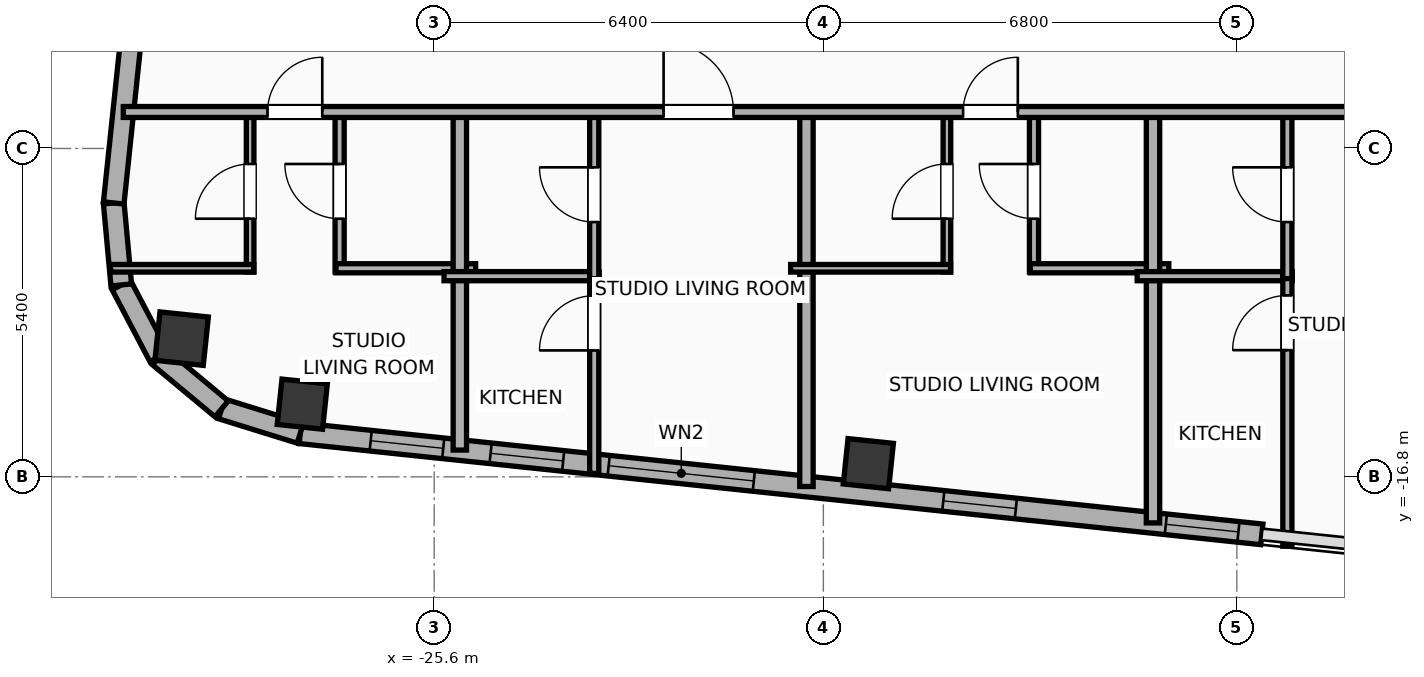
"""IFC4 building model, lengths in metres.
Left out: names, types, materials, properties, quantities, classifications, styles, units other than length and angle.
Written with IfcOpenShell. Run it as: python <this file> out.ifc"""

import sys

from ifc_helpers import new_model, si_unit, direction, frame, frame_2d, origin, origin_2d, place, context, subcontext, project, spatial, rectangle, hollow_rectangle, hollow_circle, extrude, element, fill, save


model = new_model("IFC4")
c1 = context("Model", 3, precision=1e-05, world=origin(), true_north=direction((0.0, 1.0)))
c2 = subcontext(c1, "Body", "Model", "MODEL_VIEW")
j1 = project(units=[si_unit("LENGTHUNIT", "METRE"), si_unit("PLANEANGLEUNIT", "RADIAN")], contexts=[c1])
p1 = place(None, origin())
s1 = spatial("IfcSite", under=j1, at=p1, CompositionType="ELEMENT")
p2 = place(p1, origin())
s2 = spatial("IfcBuilding", under=s1, at=p2, CompositionType="ELEMENT")
p3 = place(p2, frame((0.0, 0.0, 275.6)))
s3 = spatial("IfcBuildingStorey", under=s2, at=p3, CompositionType="ELEMENT", Elevation=275.6)
for number, where, z_axis, x_axis in (
    (1, (-27.769, -15.604, 0.0), (0.0, 0.0, 1.0), (0.995, -0.105, 0.0)),
    (2, (-18.46, -16.583, 0.0), (0.0, 0.0, 1.0), (0.995, -0.105, 0.0)),
):
    element("IfcColumn", number, at=place(p3, frame(where, z_axis=z_axis, x_axis=x_axis)), inside=s3, PredefinedType="COLUMN", context=c2, shape_type="SweptSolid", body=[
        extrude(hollow_rectangle(XDim=0.75, YDim=0.75, WallThickness=0.025, at=origin_2d()), origin(), (0.0, 0.0, 1.0), 3.9),
    ])
p4 = place(p3, frame((-29.753, -14.527, 0.0), z_axis=(0.0, 0.0, 1.0), x_axis=(0.994521895368, -0.104528463268, 0.0)))
e3 = element("IfcColumn", 3, at=p4, inside=s3, PredefinedType="COLUMN", context=c2, shape_type="SweptSolid", body=[
    extrude(hollow_circle(Radius=0.4, WallThickness=0.028, at=origin_2d()), origin(), (0.0, 0.0, 1.0), 3.9),
])
p5 = place(p3, frame((-11.989, -17.746, 0.0), z_axis=(0.0, 0.0, 1.0), x_axis=(-0.994521594531, 0.104531325504, 0.0)))
e4 = element("IfcWall", 4, at=p5, inside=s3, PredefinedType="ELEMENTEDWALL", context=c2, shape_type="SweptSolid", body=[
    extrude(rectangle(XDim=15.901, YDim=0.34, at=frame_2d((7.95, 0.0))), origin(), (0.0, 0.0, 1.0), 3.65),
])
p6 = place(p5, frame((8.4, 0.0, 0.75)))
e5 = element("IfcOpeningElement", 5, at=p6, cuts=e4, PredefinedType="OPENING", context=c2, shape_type="SweptSolid", body=[
    extrude(rectangle(XDim=2.4, YDim=2.1, at=frame_2d((1.2, 1.05))), frame((0.0, 0.18, 0.0), z_axis=(0.0, -1.0, 0.0), x_axis=(1.0, 0.0, 0.0)), (0.0, 0.0, 1.0), 0.36),
])
p7 = place(p5, frame((13.536, 0.0, 0.75)))
e6 = element("IfcOpeningElement", 6, at=p7, cuts=e4, PredefinedType="OPENING", context=c2, shape_type="SweptSolid", body=[
    extrude(rectangle(XDim=1.2, YDim=2.05, at=frame_2d((0.6, 1.025))), frame((0.0, 0.18, 0.0), z_axis=(0.0, -1.0, 0.0), x_axis=(1.0, 0.0, 0.0)), (0.0, 0.0, 1.0), 0.36),
])
p8 = place(p5, frame((11.553, 0.0, 0.75)))
e7 = element("IfcOpeningElement", 7, at=p8, cuts=e4, PredefinedType="OPENING", context=c2, shape_type="SweptSolid", body=[
    extrude(rectangle(XDim=1.2, YDim=2.05, at=frame_2d((0.6, 1.025))), frame((0.0, 0.18, 0.0), z_axis=(0.0, -1.0, 0.0), x_axis=(1.0, 0.0, 0.0)), (0.0, 0.0, 1.0), 0.36),
])
p9 = place(p5, frame((4.067, 0.0, 0.75)))
e8 = element("IfcOpeningElement", 8, at=p9, cuts=e4, PredefinedType="OPENING", context=c2, shape_type="SweptSolid", body=[
    extrude(rectangle(XDim=1.2, YDim=2.05, at=frame_2d((0.6, 1.025))), frame((0.0, 0.18, 0.0), z_axis=(0.0, -1.0, 0.0), x_axis=(1.0, 0.0, 0.0)), (0.0, 0.0, 1.0), 0.36),
])
p10 = place(p5, frame((0.387, 0.0, 0.75)))
e9 = element("IfcOpeningElement", 9, at=p10, cuts=e4, PredefinedType="OPENING", context=c2, shape_type="SweptSolid", body=[
    extrude(rectangle(XDim=1.2, YDim=2.05, at=frame_2d((0.6, 1.025))), frame((0.0, 0.18, 0.0), z_axis=(0.0, -1.0, 0.0), x_axis=(1.0, 0.0, 0.0)), (0.0, 0.0, 1.0), 0.36),
])
p11 = place(p3, frame((-27.802, -16.084, 0.0), z_axis=(0.0, 0.0, 1.0), x_axis=(-0.955007802701, 0.296580674994, 0.0)))
e10 = element("IfcWall", 10, at=p11, inside=s3, PredefinedType="ELEMENTEDWALL", context=c2, shape_type="SweptSolid", body=[
    extrude(rectangle(XDim=1.354, YDim=0.34, at=frame_2d((0.677, 0.0))), origin(), (0.0, 0.0, 1.0), 3.65),
])
p12 = place(p3, frame((-29.096, -15.682, 0.0), z_axis=(0.0, 0.0, 1.0), x_axis=(-0.768864427906, 0.639411832469, 0.0)))
e11 = element("IfcWall", 11, at=p12, inside=s3, PredefinedType="ELEMENTEDWALL", context=c2, shape_type="SweptSolid", body=[
    extrude(rectangle(XDim=1.337, YDim=0.34, at=frame_2d((0.668, 0.0))), origin(), (0.0, 0.0, 1.0), 3.65),
])
p13 = place(p3, frame((-30.124, -14.827, 0.0), z_axis=(0.0, 0.0, 1.0), x_axis=(-0.465528132217, 0.885033083062, 0.0)))
e12 = element("IfcWall", 12, at=p13, inside=s3, PredefinedType="ELEMENTEDWALL", context=c2, shape_type="SweptSolid", body=[
    extrude(rectangle(XDim=1.337, YDim=0.34, at=frame_2d((0.668, 0.0))), origin(), (0.0, 0.0, 1.0), 3.65),
])
p14 = place(p3, frame((-30.746, -13.644, 0.0), z_axis=(0.0, 0.0, 1.0), x_axis=(-0.091592370975, 0.995796584438, 0.0)))
e13 = element("IfcWall", 13, at=p14, inside=s3, PredefinedType="ELEMENTEDWALL", context=c2, shape_type="SweptSolid", body=[
    extrude(rectangle(XDim=1.354, YDim=0.34, at=frame_2d((0.677, 0.0))), origin(), (0.0, 0.0, 1.0), 3.65),
])
p15 = place(p3, frame((-30.87, -12.296, 0.0), z_axis=(0.0, 0.0, 1.0), x_axis=(0.104517379014, 0.994523060308, 0.0)))
e14 = element("IfcWall", 14, at=p15, inside=s3, PredefinedType="ELEMENTEDWALL", context=c2, shape_type="SweptSolid", body=[
    extrude(rectangle(XDim=10.325, YDim=0.34, at=frame_2d((5.162, 0.0))), origin(), (0.0, 0.0, 1.0), 3.65),
])
p16 = place(p15, frame((4.262, 0.0, 0.75)))
e15 = element("IfcOpeningElement", 15, at=p16, cuts=e14, PredefinedType="OPENING", context=c2, shape_type="SweptSolid", body=[
    extrude(rectangle(XDim=1.8, YDim=2.1, at=frame_2d((0.9, 1.05))), frame((0.0, 0.18, 0.0), z_axis=(0.0, -1.0, 0.0), x_axis=(1.0, 0.0, 0.0)), (0.0, 0.0, 1.0), 0.36),
])
p17 = place(p3, frame((-28.627, -13.43, 0.0), z_axis=(0.0, 0.0, 1.0), x_axis=(0.0, 1.0, 0.0)))
e16 = element("IfcWall", 16, at=p17, inside=s3, PredefinedType="PARTITIONING", context=c2, shape_type="SweptSolid", body=[
    extrude(rectangle(XDim=2.65, YDim=0.125, at=frame_2d((1.325, 0.0))), origin(), (0.0, 0.0, 1.0), 3.65),
])
p18 = place(p17, frame((0.875, 0.0, 0.0)))
e17 = element("IfcOpeningElement", 17, at=p18, cuts=e16, PredefinedType="OPENING", context=c2, shape_type="SweptSolid", body=[
    extrude(rectangle(XDim=0.9, YDim=2.05, at=frame_2d((0.45, 1.025))), frame((0.0, 0.073, 0.0), z_axis=(0.0, -1.0, 0.0), x_axis=(1.0, 0.0, 0.0)), (0.0, 0.0, 1.0), 0.145),
])
p19 = place(p3, frame((-27.155, -13.43, 0.0), z_axis=(0.0, 0.0, 1.0), x_axis=(0.0, 1.0, 0.0)))
e18 = element("IfcWall", 18, at=p19, inside=s3, PredefinedType="PLUMBINGWALL", context=c2, shape_type="SweptSolid", body=[
    extrude(rectangle(XDim=2.65, YDim=0.15, at=frame_2d((1.325, 0.0))), origin(), (0.0, 0.0, 1.0), 3.65),
])
p20 = place(p19, frame((0.875, 0.0, 0.0)))
e19 = element("IfcOpeningElement", 19, at=p20, cuts=e18, PredefinedType="OPENING", context=c2, shape_type="SweptSolid", body=[
    extrude(rectangle(XDim=0.9, YDim=2.05, at=frame_2d((0.45, 1.025))), frame((0.0, 0.085, 0.0), z_axis=(0.0, -1.0, 0.0), x_axis=(1.0, 0.0, 0.0)), (0.0, 0.0, 1.0), 0.17),
])
p21 = place(p3, frame((-30.922, -13.37, 0.0), z_axis=(0.0, 0.0, 1.0), x_axis=(1.0, 0.0, 0.0)))
e20 = element("IfcWall", 20, at=p21, inside=s3, PredefinedType="PARTITIONING", context=c2, shape_type="SweptSolid", body=[
    extrude(rectangle(XDim=2.355, YDim=0.125, at=frame_2d((1.178, 0.0))), origin(), (0.0, 0.0, 1.0), 3.65),
])
p22 = place(p3, frame((-27.215, -13.37, 0.0), z_axis=(0.0, 0.0, 1.0), x_axis=(1.0, 0.0, 0.0)))
e21 = element("IfcWall", 21, at=p22, inside=s3, PredefinedType="PLUMBINGWALL", context=c2, shape_type="SweptSolid", body=[
    extrude(rectangle(XDim=2.297, YDim=0.15, at=frame_2d((1.148, 0.0))), origin(), (0.0, 0.0, 1.0), 3.65),
])
p23 = place(p3, frame((-25.178, -16.36, 0.0), z_axis=(0.0, 0.0, 1.0), x_axis=(0.0, 1.0, 0.0)))
e22 = element("IfcWall", 22, at=p23, inside=s3, PredefinedType="PARTITIONING", context=c2, shape_type="SweptSolid", body=[
    extrude(rectangle(XDim=5.64, YDim=0.22, at=frame_2d((2.82, 0.0))), origin(), (0.0, 0.0, 1.0), 3.65),
])
p24 = place(p3, frame((-25.438, -13.5, 0.0), z_axis=(0.0, 0.0, 1.0), x_axis=(1.0, 0.0, 0.0)))
e23 = element("IfcWall", 23, at=p24, inside=s3, PredefinedType="PLUMBINGWALL", context=c2, shape_type="SweptSolid", body=[
    extrude(rectangle(XDim=2.55, YDim=0.15, at=frame_2d((1.275, 0.0))), origin(), (0.0, 0.0, 1.0), 3.65),
])
p25 = place(p3, frame((-22.968, -16.743, 0.0), z_axis=(0.0, 0.0, 1.0), x_axis=(0.0, 1.0, 0.0)))
e24 = element("IfcWall", 24, at=p25, inside=s3, PredefinedType="PLUMBINGWALL", context=c2, shape_type="SweptSolid", body=[
    extrude(rectangle(XDim=3.283, YDim=0.15, at=frame_2d((1.641, 0.0))), origin(), (0.0, 0.0, 1.0), 3.65),
])
p26 = place(p25, frame((2.022, 0.0, 0.0)))
e25 = element("IfcOpeningElement", 25, at=p26, cuts=e24, PredefinedType="OPENING", context=c2, shape_type="SweptSolid", body=[
    extrude(rectangle(XDim=0.9, YDim=2.05, at=frame_2d((0.45, 1.025))), frame((0.0, 0.085, 0.0), z_axis=(0.0, -1.0, 0.0), x_axis=(1.0, 0.0, 0.0)), (0.0, 0.0, 1.0), 0.17),
])
p27 = place(p3, frame((-22.968, -13.54, 0.0), z_axis=(0.0, 0.0, 1.0), x_axis=(0.0, 1.0, 0.0)))
e26 = element("IfcWall", 26, at=p27, inside=s3, PredefinedType="PLUMBINGWALL", context=c2, shape_type="SweptSolid", body=[
    extrude(rectangle(XDim=2.76, YDim=0.15, at=frame_2d((1.38, 0.0))), origin(), (0.0, 0.0, 1.0), 3.65),
])
p28 = place(p27, frame((0.93, 0.0, 0.0)))
e27 = element("IfcOpeningElement", 27, at=p28, cuts=e26, PredefinedType="OPENING", context=c2, shape_type="SweptSolid", body=[
    extrude(rectangle(XDim=0.9, YDim=2.05, at=frame_2d((0.45, 1.025))), frame((0.0, 0.085, 0.0), z_axis=(0.0, -1.0, 0.0), x_axis=(1.0, 0.0, 0.0)), (0.0, 0.0, 1.0), 0.17),
])
p29 = place(p3, frame((-19.478, -16.959, 0.0), z_axis=(0.0, 0.0, 1.0), x_axis=(0.0, 1.0, 0.0)))
e28 = element("IfcWall", 28, at=p29, inside=s3, PredefinedType="PARTITIONING", context=c2, shape_type="SweptSolid", body=[
    extrude(rectangle(XDim=6.239, YDim=0.22, at=frame_2d((3.119, 0.0))), origin(), (0.0, 0.0, 1.0), 3.65),
])
p30 = place(p3, frame((-17.168, -13.43, 0.0), z_axis=(0.0, 0.0, 1.0), x_axis=(0.0, 1.0, 0.0)))
e29 = element("IfcWall", 29, at=p30, inside=s3, PredefinedType="PARTITIONING", context=c2, shape_type="SweptSolid", body=[
    extrude(rectangle(XDim=2.65, YDim=0.125, at=frame_2d((1.325, 0.0))), origin(), (0.0, 0.0, 1.0), 3.65),
])
p31 = place(p30, frame((0.875, 0.0, 0.0)))
e30 = element("IfcOpeningElement", 30, at=p31, cuts=e29, PredefinedType="OPENING", context=c2, shape_type="SweptSolid", body=[
    extrude(rectangle(XDim=0.9, YDim=2.05, at=frame_2d((0.45, 1.025))), frame((0.0, 0.073, 0.0), z_axis=(0.0, -1.0, 0.0), x_axis=(1.0, 0.0, 0.0)), (0.0, 0.0, 1.0), 0.145),
])
p32 = place(p3, frame((-15.736, -13.43, 0.0), z_axis=(0.0, 0.0, 1.0), x_axis=(0.0, 1.0, 0.0)))
e31 = element("IfcWall", 31, at=p32, inside=s3, PredefinedType="PLUMBINGWALL", context=c2, shape_type="SweptSolid", body=[
    extrude(rectangle(XDim=2.65, YDim=0.15, at=frame_2d((1.325, 0.0))), origin(), (0.0, 0.0, 1.0), 3.65),
])
p33 = place(p32, frame((0.875, 0.0, 0.0)))
e32 = element("IfcOpeningElement", 32, at=p33, cuts=e31, PredefinedType="OPENING", context=c2, shape_type="SweptSolid", body=[
    extrude(rectangle(XDim=0.9, YDim=2.05, at=frame_2d((0.45, 1.025))), frame((0.0, 0.085, 0.0), z_axis=(0.0, -1.0, 0.0), x_axis=(1.0, 0.0, 0.0)), (0.0, 0.0, 1.0), 0.17),
])
p34 = place(p3, frame((-19.738, -13.37, 0.0), z_axis=(0.0, 0.0, 1.0), x_axis=(1.0, 0.0, 0.0)))
e33 = element("IfcWall", 33, at=p34, inside=s3, PredefinedType="PARTITIONING", context=c2, shape_type="SweptSolid", body=[
    extrude(rectangle(XDim=2.63, YDim=0.125, at=frame_2d((1.315, 0.0))), origin(), (0.0, 0.0, 1.0), 3.65),
])
p35 = place(p3, frame((-15.796, -13.37, 0.0), z_axis=(0.0, 0.0, 1.0), x_axis=(1.0, 0.0, 0.0)))
e34 = element("IfcWall", 34, at=p35, inside=s3, PredefinedType="PLUMBINGWALL", context=c2, shape_type="SweptSolid", body=[
    extrude(rectangle(XDim=2.277, YDim=0.15, at=frame_2d((1.138, 0.0))), origin(), (0.0, 0.0, 1.0), 3.65),
])
p36 = place(p3, frame((-13.779, -17.558, 0.0), z_axis=(0.0, 0.0, 1.0), x_axis=(0.0, 1.0, 0.0)))
e35 = element("IfcWall", 35, at=p36, inside=s3, PredefinedType="PARTITIONING", context=c2, shape_type="SweptSolid", body=[
    extrude(rectangle(XDim=6.838, YDim=0.22, at=frame_2d((3.419, 0.0))), origin(), (0.0, 0.0, 1.0), 3.65),
])
p37 = place(p3, frame((-14.039, -13.5, 0.0), z_axis=(0.0, 0.0, 1.0), x_axis=(1.0, 0.0, 0.0)))
e36 = element("IfcWall", 36, at=p37, inside=s3, PredefinedType="PLUMBINGWALL", context=c2, shape_type="SweptSolid", body=[
    extrude(rectangle(XDim=2.55, YDim=0.15, at=frame_2d((1.275, 0.0))), origin(), (0.0, 0.0, 1.0), 3.65),
])
p38 = place(p3, frame((-11.569, -17.941, 0.0), z_axis=(0.0, 0.0, 1.0), x_axis=(0.0, 1.0, 0.0)))
e37 = element("IfcWall", 37, at=p38, inside=s3, PredefinedType="PLUMBINGWALL", context=c2, shape_type="SweptSolid", body=[
    extrude(rectangle(XDim=4.481, YDim=0.15, at=frame_2d((2.24, 0.0))), origin(), (0.0, 0.0, 1.0), 3.65),
])
p39 = place(p38, frame((3.224, 0.0, 0.0)))
e38 = element("IfcOpeningElement", 38, at=p39, cuts=e37, PredefinedType="OPENING", context=c2, shape_type="SweptSolid", body=[
    extrude(rectangle(XDim=0.9, YDim=2.05, at=frame_2d((0.45, 1.025))), frame((0.0, 0.085, 0.0), z_axis=(0.0, -1.0, 0.0), x_axis=(1.0, 0.0, 0.0)), (0.0, 0.0, 1.0), 0.17),
])
p40 = place(p3, frame((-11.569, -13.54, 0.0), z_axis=(0.0, 0.0, 1.0), x_axis=(0.0, 1.0, 0.0)))
e39 = element("IfcWall", 39, at=p40, inside=s3, PredefinedType="PLUMBINGWALL", context=c2, shape_type="SweptSolid", body=[
    extrude(rectangle(XDim=2.76, YDim=0.15, at=frame_2d((1.38, 0.0))), origin(), (0.0, 0.0, 1.0), 3.65),
])
p41 = place(p40, frame((0.93, 0.0, 0.0)))
e40 = element("IfcOpeningElement", 40, at=p41, cuts=e39, PredefinedType="OPENING", context=c2, shape_type="SweptSolid", body=[
    extrude(rectangle(XDim=0.9, YDim=2.05, at=frame_2d((0.45, 1.025))), frame((0.0, 0.085, 0.0), z_axis=(0.0, -1.0, 0.0), x_axis=(1.0, 0.0, 0.0)), (0.0, 0.0, 1.0), 0.17),
])
p42 = place(p3, frame((-30.713, -10.8, 0.0), z_axis=(0.0, 0.0, 1.0), x_axis=(1.0, 0.0, 0.0)))
e41 = element("IfcWall", 41, at=p42, inside=s3, PredefinedType="PARTITIONING", context=c2, shape_type="SweptSolid", body=[
    extrude(rectangle(XDim=22.633, YDim=0.18, at=frame_2d((11.316, 0.0))), origin(), (0.0, 0.0, 1.0), 3.65),
])
p43 = place(p42, frame((2.372, 0.0, 0.0)))
e42 = element("IfcOpeningElement", 42, at=p43, cuts=e41, PredefinedType="OPENING", context=c2, shape_type="SweptSolid", body=[
    extrude(rectangle(XDim=0.9, YDim=2.05, at=frame_2d((0.45, 1.025))), frame((0.0, 0.1, 0.0), z_axis=(0.0, -1.0, 0.0), x_axis=(1.0, 0.0, 0.0)), (0.0, 0.0, 1.0), 0.2),
])
p44 = place(p42, frame((8.885, 0.0, 0.0)))
e43 = element("IfcOpeningElement", 43, at=p44, cuts=e41, PredefinedType="OPENING", context=c2, shape_type="SweptSolid", body=[
    extrude(rectangle(XDim=1.15, YDim=2.05, at=frame_2d((0.575, 1.025))), frame((0.0, 0.1, 0.0), z_axis=(0.0, -1.0, 0.0), x_axis=(1.0, 0.0, 0.0)), (0.0, 0.0, 1.0), 0.2),
])
p45 = place(p42, frame((13.811, 0.0, 0.0)))
e44 = element("IfcOpeningElement", 44, at=p45, cuts=e41, PredefinedType="OPENING", context=c2, shape_type="SweptSolid", body=[
    extrude(rectangle(XDim=0.9, YDim=2.05, at=frame_2d((0.45, 1.025))), frame((0.0, 0.1, 0.0), z_axis=(0.0, -1.0, 0.0), x_axis=(1.0, 0.0, 0.0)), (0.0, 0.0, 1.0), 0.2),
])
p46 = place(p42, frame((20.283, 0.0, 0.0)))
e45 = element("IfcOpeningElement", 45, at=p46, cuts=e41, PredefinedType="OPENING", context=c2, shape_type="SweptSolid", body=[
    extrude(rectangle(XDim=1.15, YDim=2.05, at=frame_2d((0.575, 1.025))), frame((0.0, 0.1, 0.0), z_axis=(0.0, -1.0, 0.0), x_axis=(1.0, 0.0, 0.0)), (0.0, 0.0, 1.0), 0.2),
])
p47 = place(p6, origin())
e46 = element("IfcWindow", 46, at=p47, inside=s3, PartitioningType="SINGLE_PANEL", PredefinedType="WINDOW", context=c2, shape_type="SweptSolid", body=[
    extrude(rectangle(XDim=2.4, YDim=2.1, at=frame_2d((1.2, 1.05))), frame((0.0, 0.03, 0.0), z_axis=(0.0, -1.0, 0.0), x_axis=(1.0, 0.0, 0.0)), (0.0, 0.0, 1.0), 0.06),
])
fill(e5, e46)
p48 = place(p7, origin())
e47 = element("IfcWindow", 47, at=p48, inside=s3, PartitioningType="SINGLE_PANEL", PredefinedType="WINDOW", context=c2, shape_type="SweptSolid", body=[
    extrude(rectangle(XDim=1.2, YDim=2.05, at=frame_2d((0.6, 1.025))), frame((0.0, 0.03, 0.0), z_axis=(0.0, -1.0, 0.0), x_axis=(1.0, 0.0, 0.0)), (0.0, 0.0, 1.0), 0.06),
])
fill(e6, e47)
p49 = place(p8, origin())
e48 = element("IfcWindow", 48, at=p49, inside=s3, PartitioningType="SINGLE_PANEL", PredefinedType="WINDOW", context=c2, shape_type="SweptSolid", body=[
    extrude(rectangle(XDim=1.2, YDim=2.05, at=frame_2d((0.6, 1.025))), frame((0.0, 0.03, 0.0), z_axis=(0.0, -1.0, 0.0), x_axis=(1.0, 0.0, 0.0)), (0.0, 0.0, 1.0), 0.06),
])
fill(e7, e48)
p50 = place(p9, origin())
e49 = element("IfcWindow", 49, at=p50, inside=s3, PartitioningType="SINGLE_PANEL", PredefinedType="WINDOW", context=c2, shape_type="SweptSolid", body=[
    extrude(rectangle(XDim=1.2, YDim=2.05, at=frame_2d((0.6, 1.025))), frame((0.0, 0.03, 0.0), z_axis=(0.0, -1.0, 0.0), x_axis=(1.0, 0.0, 0.0)), (0.0, 0.0, 1.0), 0.06),
])
fill(e8, e49)
p51 = place(p10, origin())
e50 = element("IfcWindow", 50, at=p51, inside=s3, PartitioningType="SINGLE_PANEL", PredefinedType="WINDOW", context=c2, shape_type="SweptSolid", body=[
    extrude(rectangle(XDim=1.2, YDim=2.05, at=frame_2d((0.6, 1.025))), frame((0.0, 0.03, 0.0), z_axis=(0.0, -1.0, 0.0), x_axis=(1.0, 0.0, 0.0)), (0.0, 0.0, 1.0), 0.06),
])
fill(e9, e50)
p52 = place(p18, origin())
e51 = element("IfcDoor", 51, at=p52, inside=s3, OperationType="SINGLE_SWING_LEFT", PredefinedType="DOOR", context=c2, shape_type="SweptSolid", body=[
    extrude(rectangle(XDim=0.9, YDim=2.05, at=frame_2d((0.45, 1.025))), frame((0.0, 0.025, 0.0), z_axis=(0.0, -1.0, 0.0), x_axis=(1.0, 0.0, 0.0)), (0.0, 0.0, 1.0), 0.05),
])
fill(e17, e51)
p53 = place(p20, origin())
e52 = element("IfcDoor", 52, at=p53, inside=s3, OperationType="SINGLE_SWING_RIGHT", PredefinedType="DOOR", context=c2, shape_type="SweptSolid", body=[
    extrude(rectangle(XDim=0.9, YDim=2.05, at=frame_2d((0.45, 1.025))), frame((0.0, 0.025, 0.0), z_axis=(0.0, -1.0, 0.0), x_axis=(1.0, 0.0, 0.0)), (0.0, 0.0, 1.0), 0.05),
])
fill(e19, e52)
p54 = place(p26, origin())
e53 = element("IfcDoor", 53, at=p54, inside=s3, OperationType="SINGLE_SWING_LEFT", PredefinedType="DOOR", context=c2, shape_type="SweptSolid", body=[
    extrude(rectangle(XDim=0.9, YDim=2.05, at=frame_2d((0.45, 1.025))), frame((0.0, 0.025, 0.0), z_axis=(0.0, -1.0, 0.0), x_axis=(1.0, 0.0, 0.0)), (0.0, 0.0, 1.0), 0.05),
])
fill(e25, e53)
p55 = place(p28, origin())
e54 = element("IfcDoor", 54, at=p55, inside=s3, OperationType="SINGLE_SWING_RIGHT", PredefinedType="DOOR", context=c2, shape_type="SweptSolid", body=[
    extrude(rectangle(XDim=0.9, YDim=2.05, at=frame_2d((0.45, 1.025))), frame((0.0, 0.025, 0.0), z_axis=(0.0, -1.0, 0.0), x_axis=(1.0, 0.0, 0.0)), (0.0, 0.0, 1.0), 0.05),
])
fill(e27, e54)
p56 = place(p31, origin())
e55 = element("IfcDoor", 55, at=p56, inside=s3, OperationType="SINGLE_SWING_LEFT", PredefinedType="DOOR", context=c2, shape_type="SweptSolid", body=[
    extrude(rectangle(XDim=0.9, YDim=2.05, at=frame_2d((0.45, 1.025))), frame((0.0, 0.025, 0.0), z_axis=(0.0, -1.0, 0.0), x_axis=(1.0, 0.0, 0.0)), (0.0, 0.0, 1.0), 0.05),
])
fill(e30, e55)
p57 = place(p33, origin())
e56 = element("IfcDoor", 56, at=p57, inside=s3, OperationType="SINGLE_SWING_RIGHT", PredefinedType="DOOR", context=c2, shape_type="SweptSolid", body=[
    extrude(rectangle(XDim=0.9, YDim=2.05, at=frame_2d((0.45, 1.025))), frame((0.0, 0.025, 0.0), z_axis=(0.0, -1.0, 0.0), x_axis=(1.0, 0.0, 0.0)), (0.0, 0.0, 1.0), 0.05),
])
fill(e32, e56)
p58 = place(p39, origin())
e57 = element("IfcDoor", 57, at=p58, inside=s3, OperationType="SINGLE_SWING_LEFT", PredefinedType="DOOR", context=c2, shape_type="SweptSolid", body=[
    extrude(rectangle(XDim=0.9, YDim=2.05, at=frame_2d((0.45, 1.025))), frame((0.0, 0.025, 0.0), z_axis=(0.0, -1.0, 0.0), x_axis=(1.0, 0.0, 0.0)), (0.0, 0.0, 1.0), 0.05),
])
fill(e38, e57)
p59 = place(p41, origin())
e58 = element("IfcDoor", 58, at=p59, inside=s3, OperationType="SINGLE_SWING_RIGHT", PredefinedType="DOOR", context=c2, shape_type="SweptSolid", body=[
    extrude(rectangle(XDim=0.9, YDim=2.05, at=frame_2d((0.45, 1.025))), frame((0.0, 0.025, 0.0), z_axis=(0.0, -1.0, 0.0), x_axis=(1.0, 0.0, 0.0)), (0.0, 0.0, 1.0), 0.05),
])
fill(e40, e58)
p60 = place(p43, origin())
e59 = element("IfcDoor", 59, at=p60, inside=s3, OperationType="SINGLE_SWING_RIGHT", PredefinedType="DOOR", context=c2, shape_type="SweptSolid", body=[
    extrude(rectangle(XDim=0.9, YDim=2.05, at=frame_2d((0.45, 1.025))), frame((0.0, 0.025, 0.0), z_axis=(0.0, -1.0, 0.0), x_axis=(1.0, 0.0, 0.0)), (0.0, 0.0, 1.0), 0.05),
])
fill(e42, e59)
p61 = place(p44, origin())
e60 = element("IfcDoor", 60, at=p61, inside=s3, OperationType="SINGLE_SWING_LEFT", PredefinedType="DOOR", context=c2, shape_type="SweptSolid", body=[
    extrude(rectangle(XDim=1.15, YDim=2.05, at=frame_2d((0.575, 1.025))), frame((0.0, 0.025, 0.0), z_axis=(0.0, -1.0, 0.0), x_axis=(1.0, 0.0, 0.0)), (0.0, 0.0, 1.0), 0.05),
])
fill(e43, e60)
p62 = place(p45, origin())
e61 = element("IfcDoor", 61, at=p62, inside=s3, OperationType="SINGLE_SWING_RIGHT", PredefinedType="DOOR", context=c2, shape_type="SweptSolid", body=[
    extrude(rectangle(XDim=0.9, YDim=2.05, at=frame_2d((0.45, 1.025))), frame((0.0, 0.025, 0.0), z_axis=(0.0, -1.0, 0.0), x_axis=(1.0, 0.0, 0.0)), (0.0, 0.0, 1.0), 0.05),
])
fill(e44, e61)
save(model, sys.argv[1])
